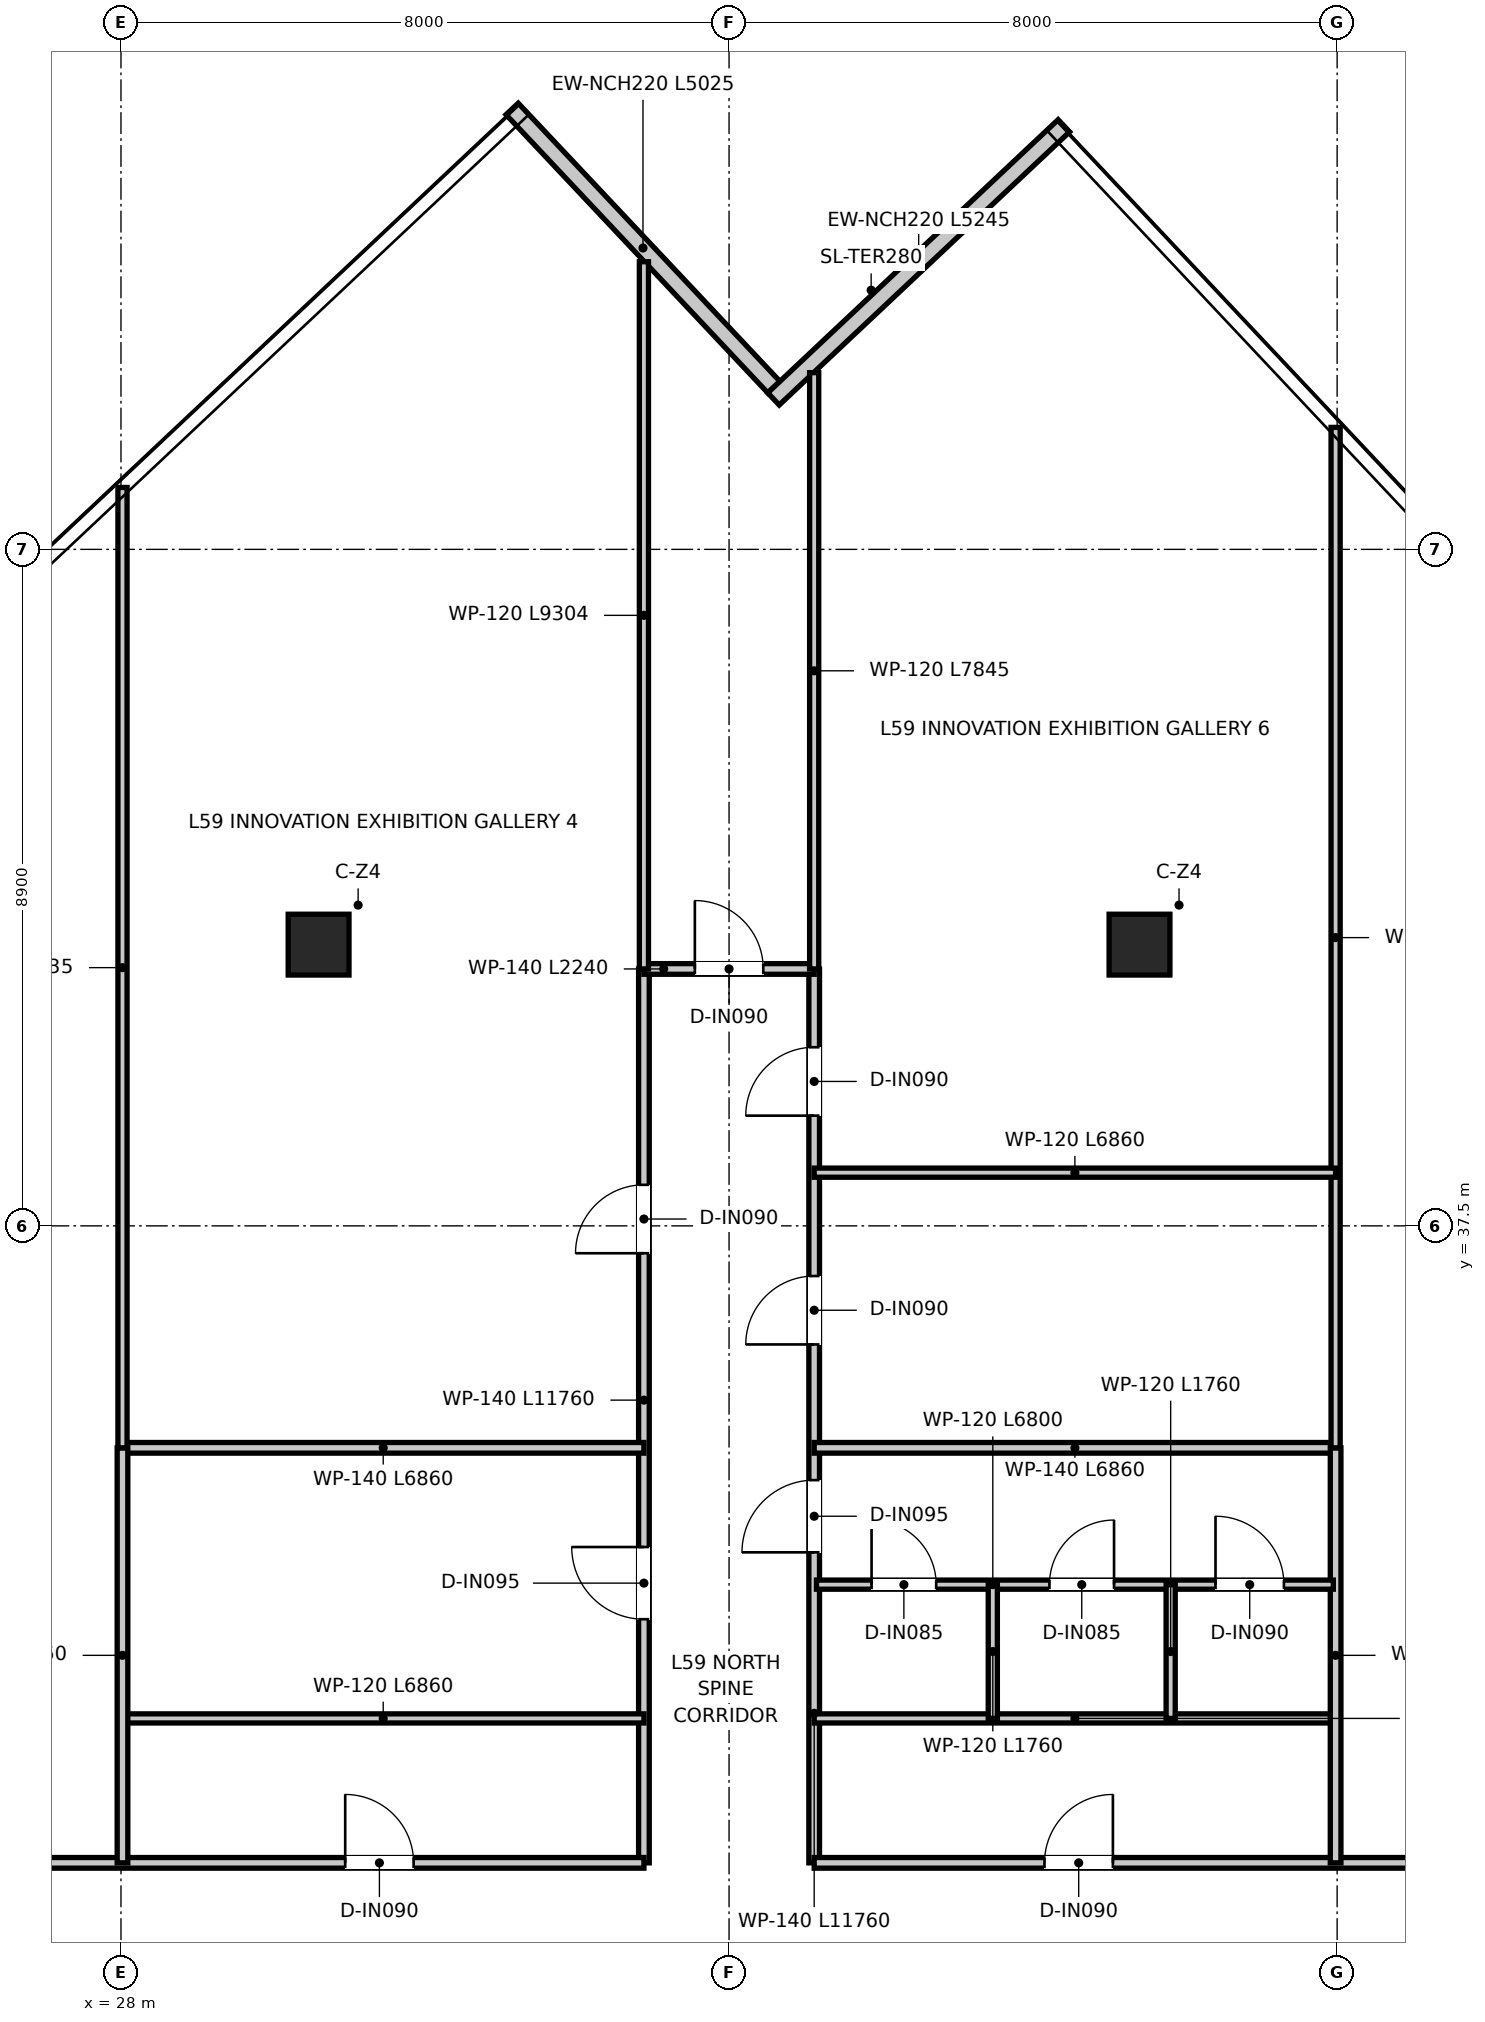
"""IFC4 building model, lengths in metres.
Left out: names, types, materials, properties, quantities, classifications, styles, units other than length and angle.
Written with IfcOpenShell. Run it as: python <this file> out.ifc"""

import sys

from ifc_helpers import new_model, si_unit, direction, frame, frame_2d, origin, origin_2d, place, context, subcontext, project, spatial, rectangle, extrude, source, transform, mapped, element, fill, save


model = new_model("IFC4")
c1 = context("Model", 3, precision=1e-05, world=origin(), true_north=direction((0.0, 1.0)))
c2 = subcontext(c1, "Body", "Model", "MODEL_VIEW")
j1 = project(units=[si_unit("LENGTHUNIT", "METRE"), si_unit("PLANEANGLEUNIT", "RADIAN")], contexts=[c1])
p1 = place(None, origin())
s1 = spatial("IfcSite", under=j1, at=p1, CompositionType="ELEMENT")
p2 = place(p1, origin())
s2 = spatial("IfcBuilding", under=s1, at=p2, CompositionType="ELEMENT")
p3 = place(p2, frame((0.0, 0.0, 242.85)))
s3 = spatial("IfcBuildingStorey", under=s2, at=p3, CompositionType="ELEMENT", Elevation=242.85)
m1 = source(origin(), c2, "Body", "SweptSolid", [
    extrude(rectangle(XDim=0.8, YDim=0.8, at=origin_2d()), origin(), (0.0, 0.0, 1.0), 3.95),
])
for number, where, z_axis, x_axis in (
    (1, (30.6, 41.2, 0.0), (0.0, 0.0, 1.0), (1.0, 0.0, 0.0)),
    (2, (41.4, 41.2, 0.0), (0.0, 0.0, 1.0), (1.0, 0.0, 0.0)),
):
    element("IfcColumn", number, at=place(p3, frame(where, z_axis=z_axis, x_axis=x_axis)), inside=s3, PredefinedType="COLUMN", context=c2, shape_type="MappedRepresentation", body=[
        mapped(m1, transform((0.0, 0.0, 0.0), x_axis=(1.0, 0.0, 0.0), y_axis=(0.0, 1.0, 0.0), z_axis=(0.0, 0.0, 1.0), scale=1.0)),
    ])
p4 = place(p3, frame((36.589, 48.535, 0.0), z_axis=(0.0, 0.0, 1.0), x_axis=(-0.685181305796, 0.728372554527, 0.0)))
e3 = element("IfcWall", 3, at=p4, inside=s3, PredefinedType="ELEMENTEDWALL", context=c2, shape_type="SweptSolid", body=[
    extrude(rectangle(XDim=5.025, YDim=0.22, at=frame_2d((2.513, 0.0))), origin(), (0.0, 0.0, 1.0), 3.67),
])
p5 = place(p3, frame((40.405, 51.973, 0.0), z_axis=(0.0, 0.0, 1.0), x_axis=(-0.728374884992, -0.685178828418, 0.0)))
e4 = element("IfcWall", 4, at=p5, inside=s3, PredefinedType="ELEMENTEDWALL", context=c2, shape_type="SweptSolid", body=[
    extrude(rectangle(XDim=5.245, YDim=0.22, at=frame_2d((2.623, 0.0))), origin(), (0.0, 0.0, 1.0), 3.67),
])
p6 = place(p3, frame((34.88, 29.12, 0.0), z_axis=(0.0, 0.0, 1.0), x_axis=(0.0, 1.0, 0.0)))
e5 = element("IfcWall", 5, at=p6, inside=s3, PredefinedType="PARTITIONING", context=c2, shape_type="SweptSolid", body=[
    extrude(rectangle(XDim=11.76, YDim=0.14, at=frame_2d((5.88, 0.0))), origin(), (0.0, 0.0, 1.0), 3.03),
])
p7 = place(p6, frame((3.205, 0.0, 0.0)))
e6 = element("IfcOpeningElement", 6, at=p7, cuts=e5, PredefinedType="OPENING", context=c2, shape_type="SweptSolid", body=[
    extrude(rectangle(XDim=0.95, YDim=2.1, at=frame_2d((0.475, 1.05))), frame((0.0, 0.08, 0.0), z_axis=(0.0, -1.0, 0.0), x_axis=(1.0, 0.0, 0.0)), (0.0, 0.0, 1.0), 0.16),
])
p8 = place(p6, frame((8.02, 0.0, 0.0)))
e7 = element("IfcOpeningElement", 7, at=p8, cuts=e5, PredefinedType="OPENING", context=c2, shape_type="SweptSolid", body=[
    extrude(rectangle(XDim=0.9, YDim=2.1, at=frame_2d((0.45, 1.05))), frame((0.0, 0.08, 0.0), z_axis=(0.0, -1.0, 0.0), x_axis=(1.0, 0.0, 0.0)), (0.0, 0.0, 1.0), 0.16),
])
p9 = place(p3, frame((37.12, 29.12, 0.0), z_axis=(0.0, 0.0, 1.0), x_axis=(0.0, 1.0, 0.0)))
e8 = element("IfcWall", 8, at=p9, inside=s3, PredefinedType="PARTITIONING", context=c2, shape_type="SweptSolid", body=[
    extrude(rectangle(XDim=11.76, YDim=0.14, at=frame_2d((5.88, 0.0))), origin(), (0.0, 0.0, 1.0), 3.03),
])
p10 = place(p9, frame((4.085, 0.0, 0.0)))
e9 = element("IfcOpeningElement", 9, at=p10, cuts=e8, PredefinedType="OPENING", context=c2, shape_type="SweptSolid", body=[
    extrude(rectangle(XDim=0.95, YDim=2.1, at=frame_2d((0.475, 1.05))), frame((0.0, 0.08, 0.0), z_axis=(0.0, -1.0, 0.0), x_axis=(1.0, 0.0, 0.0)), (0.0, 0.0, 1.0), 0.16),
])
p11 = place(p9, frame((6.82, 0.0, 0.0)))
e10 = element("IfcOpeningElement", 10, at=p11, cuts=e8, PredefinedType="OPENING", context=c2, shape_type="SweptSolid", body=[
    extrude(rectangle(XDim=0.9, YDim=2.1, at=frame_2d((0.45, 1.05))), frame((0.0, 0.08, 0.0), z_axis=(0.0, -1.0, 0.0), x_axis=(1.0, 0.0, 0.0)), (0.0, 0.0, 1.0), 0.16),
])
p12 = place(p9, frame((9.83, 0.0, 0.0)))
e11 = element("IfcOpeningElement", 11, at=p12, cuts=e8, PredefinedType="OPENING", context=c2, shape_type="SweptSolid", body=[
    extrude(rectangle(XDim=0.9, YDim=2.1, at=frame_2d((0.45, 1.05))), frame((0.0, 0.08, 0.0), z_axis=(0.0, -1.0, 0.0), x_axis=(1.0, 0.0, 0.0)), (0.0, 0.0, 1.0), 0.16),
])
p13 = place(p3, frame((34.88, 40.88, 0.0), z_axis=(0.0, 0.0, 1.0), x_axis=(1.0, 0.0, 0.0)))
e12 = element("IfcWall", 12, at=p13, inside=s3, PredefinedType="PARTITIONING", context=c2, shape_type="SweptSolid", body=[
    extrude(rectangle(XDim=2.24, YDim=0.14, at=frame_2d((1.12, 0.0))), origin(), (0.0, 0.0, 1.0), 3.67),
])
p14 = place(p13, frame((0.67, 0.0, 0.0)))
e13 = element("IfcOpeningElement", 13, at=p14, cuts=e12, PredefinedType="OPENING", context=c2, shape_type="SweptSolid", body=[
    extrude(rectangle(XDim=0.9, YDim=2.1, at=frame_2d((0.45, 1.05))), frame((0.0, 0.08, 0.0), z_axis=(0.0, -1.0, 0.0), x_axis=(1.0, 0.0, 0.0)), (0.0, 0.0, 1.0), 0.16),
])
p15 = place(p3, frame((12.752, 29.12, 0.0), z_axis=(0.0, 0.0, 1.0), x_axis=(1.0, 0.0, 0.0)))
e14 = element("IfcWall", 14, at=p15, inside=s3, PredefinedType="PARTITIONING", context=c2, shape_type="SweptSolid", body=[
    extrude(rectangle(XDim=22.128, YDim=0.14, at=frame_2d((11.064, 0.0))), origin(), (0.0, 0.0, 1.0), 3.03),
])
p16 = place(p15, frame((18.198, 0.0, 0.0)))
e15 = element("IfcOpeningElement", 15, at=p16, cuts=e14, PredefinedType="OPENING", context=c2, shape_type="SweptSolid", body=[
    extrude(rectangle(XDim=0.9, YDim=2.1, at=frame_2d((0.45, 1.05))), frame((0.0, 0.08, 0.0), z_axis=(0.0, -1.0, 0.0), x_axis=(1.0, 0.0, 0.0)), (0.0, 0.0, 1.0), 0.16),
])
p17 = place(p15, frame((4.178, 0.0, 0.0)))
e16 = element("IfcOpeningElement", 16, at=p17, cuts=e14, PredefinedType="OPENING", context=c2, shape_type="SweptSolid", body=[
    extrude(rectangle(XDim=0.9, YDim=2.1, at=frame_2d((0.45, 1.05))), frame((0.0, 0.08, 0.0), z_axis=(0.0, -1.0, 0.0), x_axis=(1.0, 0.0, 0.0)), (0.0, 0.0, 1.0), 0.16),
])
p18 = place(p15, frame((12.198, 0.0, 0.0)))
e17 = element("IfcOpeningElement", 17, at=p18, cuts=e14, PredefinedType="OPENING", context=c2, shape_type="SweptSolid", body=[
    extrude(rectangle(XDim=0.9, YDim=2.1, at=frame_2d((0.45, 1.05))), frame((0.0, 0.08, 0.0), z_axis=(0.0, -1.0, 0.0), x_axis=(1.0, 0.0, 0.0)), (0.0, 0.0, 1.0), 0.16),
])
p19 = place(p3, frame((37.12, 29.12, 0.0), z_axis=(0.0, 0.0, 1.0), x_axis=(1.0, 0.0, 0.0)))
e18 = element("IfcWall", 18, at=p19, inside=s3, PredefinedType="PARTITIONING", context=c2, shape_type="SweptSolid", body=[
    extrude(rectangle(XDim=23.746, YDim=0.14, at=frame_2d((11.873, 0.0))), origin(), (0.0, 0.0, 1.0), 3.03),
])
p20 = place(p19, frame((3.03, 0.0, 0.0)))
e19 = element("IfcOpeningElement", 19, at=p20, cuts=e18, PredefinedType="OPENING", context=c2, shape_type="SweptSolid", body=[
    extrude(rectangle(XDim=0.9, YDim=2.1, at=frame_2d((0.45, 1.05))), frame((0.0, 0.08, 0.0), z_axis=(0.0, -1.0, 0.0), x_axis=(1.0, 0.0, 0.0)), (0.0, 0.0, 1.0), 0.16),
])
p21 = place(p19, frame((14.64, 0.0, 0.0)))
e20 = element("IfcOpeningElement", 20, at=p21, cuts=e18, PredefinedType="OPENING", context=c2, shape_type="SweptSolid", body=[
    extrude(rectangle(XDim=0.9, YDim=2.1, at=frame_2d((0.45, 1.05))), frame((0.0, 0.08, 0.0), z_axis=(0.0, -1.0, 0.0), x_axis=(1.0, 0.0, 0.0)), (0.0, 0.0, 1.0), 0.16),
])
for number, where, z_axis, x_axis in (
    (21, (28.02, 31.02, 0.0), (0.0, 0.0, 1.0), (1.0, 0.0, 0.0)),
    (22, (37.12, 31.02, 0.0), (0.0, 0.0, 1.0), (1.0, 0.0, 0.0)),
):
    element("IfcWall", number, at=place(p3, frame(where, z_axis=z_axis, x_axis=x_axis)), inside=s3, PredefinedType="PARTITIONING", context=c2, shape_type="SweptSolid", body=[
        extrude(rectangle(XDim=6.86, YDim=0.12, at=frame_2d((3.43, 0.0))), origin(), (0.0, 0.0, 1.0), 3.18),
    ])
for number, where, z_axis, x_axis in (
    (23, (28.02, 34.58, 0.0), (0.0, 0.0, 1.0), (1.0, 0.0, 0.0)),
    (24, (37.12, 34.58, 0.0), (0.0, 0.0, 1.0), (1.0, 0.0, 0.0)),
):
    element("IfcWall", number, at=place(p3, frame(where, z_axis=z_axis, x_axis=x_axis)), inside=s3, PredefinedType="PARTITIONING", context=c2, shape_type="SweptSolid", body=[
        extrude(rectangle(XDim=6.86, YDim=0.14, at=frame_2d((3.43, 0.0))), origin(), (0.0, 0.0, 1.0), 3.18),
    ])
for number, where, z_axis, x_axis in (
    (25, (28.02, 29.12, 0.0), (0.0, 0.0, 1.0), (0.0, 1.0, 0.0)),
    (26, (43.98, 29.12, 0.0), (0.0, 0.0, 1.0), (0.0, 1.0, 0.0)),
):
    element("IfcWall", number, at=place(p3, frame(where, z_axis=z_axis, x_axis=x_axis)), inside=s3, PredefinedType="PARTITIONING", context=c2, shape_type="SweptSolid", body=[
        extrude(rectangle(XDim=5.46, YDim=0.14, at=frame_2d((2.73, 0.0))), origin(), (0.0, 0.0, 1.0), 3.37),
    ])
p22 = place(p3, frame((37.15, 32.78, 0.0), z_axis=(0.0, 0.0, 1.0), x_axis=(1.0, 0.0, 0.0)))
e27 = element("IfcWall", 27, at=p22, inside=s3, PredefinedType="PARTITIONING", context=c2, shape_type="SweptSolid", body=[
    extrude(rectangle(XDim=6.8, YDim=0.12, at=frame_2d((3.4, 0.0))), origin(), (0.0, 0.0, 1.0), 3.18),
])
p23 = place(p22, frame((0.725, 0.0, 0.0)))
e28 = element("IfcOpeningElement", 28, at=p23, cuts=e27, PredefinedType="OPENING", context=c2, shape_type="SweptSolid", body=[
    extrude(rectangle(XDim=0.85, YDim=2.1, at=frame_2d((0.425, 1.05))), frame((0.0, 0.07, 0.0), z_axis=(0.0, -1.0, 0.0), x_axis=(1.0, 0.0, 0.0)), (0.0, 0.0, 1.0), 0.14),
])
p24 = place(p22, frame((3.065, 0.0, 0.0)))
e29 = element("IfcOpeningElement", 29, at=p24, cuts=e27, PredefinedType="OPENING", context=c2, shape_type="SweptSolid", body=[
    extrude(rectangle(XDim=0.85, YDim=2.1, at=frame_2d((0.425, 1.05))), frame((0.0, 0.07, 0.0), z_axis=(0.0, -1.0, 0.0), x_axis=(1.0, 0.0, 0.0)), (0.0, 0.0, 1.0), 0.14),
])
p25 = place(p22, frame((5.25, 0.0, 0.0)))
e30 = element("IfcOpeningElement", 30, at=p25, cuts=e27, PredefinedType="OPENING", context=c2, shape_type="SweptSolid", body=[
    extrude(rectangle(XDim=0.9, YDim=2.1, at=frame_2d((0.45, 1.05))), frame((0.0, 0.07, 0.0), z_axis=(0.0, -1.0, 0.0), x_axis=(1.0, 0.0, 0.0)), (0.0, 0.0, 1.0), 0.14),
])
for number, where, z_axis, x_axis in (
    (31, (39.47, 31.02, 0.0), (0.0, 0.0, 1.0), (0.0, 1.0, 0.0)),
    (32, (41.81, 31.02, 0.0), (0.0, 0.0, 1.0), (0.0, 1.0, 0.0)),
):
    element("IfcWall", number, at=place(p3, frame(where, z_axis=z_axis, x_axis=x_axis)), inside=s3, PredefinedType="PARTITIONING", context=c2, shape_type="SweptSolid", body=[
        extrude(rectangle(XDim=1.76, YDim=0.12, at=frame_2d((0.88, 0.0))), origin(), (0.0, 0.0, 1.0), 3.67),
    ])
p26 = place(p3, frame((34.88, 40.88, 0.0), z_axis=(0.0, 0.0, 1.0), x_axis=(0.0, 1.0, 0.0)))
e33 = element("IfcWall", 33, at=p26, inside=s3, PredefinedType="PARTITIONING", context=c2, shape_type="SweptSolid", body=[
    extrude(rectangle(XDim=9.304, YDim=0.12, at=frame_2d((4.652, 0.0))), origin(), (0.0, 0.0, 1.0), 3.28),
])
p27 = place(p3, frame((37.12, 40.88, 0.0), z_axis=(0.0, 0.0, 1.0), x_axis=(0.0, 1.0, 0.0)))
e34 = element("IfcWall", 34, at=p27, inside=s3, PredefinedType="PARTITIONING", context=c2, shape_type="SweptSolid", body=[
    extrude(rectangle(XDim=7.845, YDim=0.12, at=frame_2d((3.923, 0.0))), origin(), (0.0, 0.0, 1.0), 3.28),
])
p28 = place(p3, frame((28.02, 34.58, 0.0), z_axis=(0.0, 0.0, 1.0), x_axis=(0.0, 1.0, 0.0)))
e35 = element("IfcWall", 35, at=p28, inside=s3, PredefinedType="PARTITIONING", context=c2, shape_type="SweptSolid", body=[
    extrude(rectangle(XDim=12.635, YDim=0.12, at=frame_2d((6.317, 0.0))), origin(), (0.0, 0.0, 1.0), 3.03),
])
p29 = place(p3, frame((43.98, 34.58, 0.0), z_axis=(0.0, 0.0, 1.0), x_axis=(0.0, 1.0, 0.0)))
e36 = element("IfcWall", 36, at=p29, inside=s3, PredefinedType="PARTITIONING", context=c2, shape_type="SweptSolid", body=[
    extrude(rectangle(XDim=13.425, YDim=0.12, at=frame_2d((6.712, 0.0))), origin(), (0.0, 0.0, 1.0), 3.03),
])
p30 = place(p3, frame((37.12, 38.2, 0.0), z_axis=(0.0, 0.0, 1.0), x_axis=(1.0, 0.0, 0.0)))
e37 = element("IfcWall", 37, at=p30, inside=s3, PredefinedType="PARTITIONING", context=c2, shape_type="SweptSolid", body=[
    extrude(rectangle(XDim=6.86, YDim=0.12, at=frame_2d((3.43, 0.0))), origin(), (0.0, 0.0, 1.0), 3.18),
])
p31 = place(p16, origin())
e38 = element("IfcDoor", 38, at=p31, inside=s3, OperationType="SINGLE_SWING_LEFT", PredefinedType="DOOR", context=c2, shape_type="SweptSolid", body=[
    extrude(rectangle(XDim=0.9, YDim=2.1, at=frame_2d((0.45, 1.05))), frame((0.0, 0.025, 0.0), z_axis=(0.0, -1.0, 0.0), x_axis=(1.0, 0.0, 0.0)), (0.0, 0.0, 1.0), 0.05),
])
fill(e15, e38)
p32 = place(p20, origin())
e39 = element("IfcDoor", 39, at=p32, inside=s3, OperationType="SINGLE_SWING_RIGHT", PredefinedType="DOOR", context=c2, shape_type="SweptSolid", body=[
    extrude(rectangle(XDim=0.9, YDim=2.1, at=frame_2d((0.45, 1.05))), frame((0.0, 0.025, 0.0), z_axis=(0.0, -1.0, 0.0), x_axis=(1.0, 0.0, 0.0)), (0.0, 0.0, 1.0), 0.05),
])
fill(e19, e39)
p33 = place(p10, origin())
e40 = element("IfcDoor", 40, at=p33, inside=s3, OperationType="SINGLE_SWING_LEFT", PredefinedType="DOOR", context=c2, shape_type="SweptSolid", body=[
    extrude(rectangle(XDim=0.95, YDim=2.1, at=frame_2d((0.475, 1.05))), frame((0.0, 0.025, 0.0), z_axis=(0.0, -1.0, 0.0), x_axis=(1.0, 0.0, 0.0)), (0.0, 0.0, 1.0), 0.05),
])
fill(e9, e40)
p34 = place(p7, origin())
e41 = element("IfcDoor", 41, at=p34, inside=s3, OperationType="SINGLE_SWING_RIGHT", PredefinedType="DOOR", context=c2, shape_type="SweptSolid", body=[
    extrude(rectangle(XDim=0.95, YDim=2.1, at=frame_2d((0.475, 1.05))), frame((0.0, 0.025, 0.0), z_axis=(0.0, -1.0, 0.0), x_axis=(1.0, 0.0, 0.0)), (0.0, 0.0, 1.0), 0.05),
])
fill(e6, e41)
p35 = place(p23, origin())
e42 = element("IfcDoor", 42, at=p35, inside=s3, OperationType="SINGLE_SWING_LEFT", PredefinedType="DOOR", context=c2, shape_type="SweptSolid", body=[
    extrude(rectangle(XDim=0.85, YDim=2.1, at=frame_2d((0.425, 1.05))), frame((0.0, 0.025, 0.0), z_axis=(0.0, -1.0, 0.0), x_axis=(1.0, 0.0, 0.0)), (0.0, 0.0, 1.0), 0.05),
])
fill(e28, e42)
p36 = place(p24, origin())
e43 = element("IfcDoor", 43, at=p36, inside=s3, OperationType="SINGLE_SWING_RIGHT", PredefinedType="DOOR", context=c2, shape_type="SweptSolid", body=[
    extrude(rectangle(XDim=0.85, YDim=2.1, at=frame_2d((0.425, 1.05))), frame((0.0, 0.025, 0.0), z_axis=(0.0, -1.0, 0.0), x_axis=(1.0, 0.0, 0.0)), (0.0, 0.0, 1.0), 0.05),
])
fill(e29, e43)
p37 = place(p25, origin())
e44 = element("IfcDoor", 44, at=p37, inside=s3, OperationType="SINGLE_SWING_LEFT", PredefinedType="DOOR", context=c2, shape_type="SweptSolid", body=[
    extrude(rectangle(XDim=0.9, YDim=2.1, at=frame_2d((0.45, 1.05))), frame((0.0, 0.025, 0.0), z_axis=(0.0, -1.0, 0.0), x_axis=(1.0, 0.0, 0.0)), (0.0, 0.0, 1.0), 0.05),
])
fill(e30, e44)
p38 = place(p14, origin())
e45 = element("IfcDoor", 45, at=p38, inside=s3, OperationType="SINGLE_SWING_LEFT", PredefinedType="DOOR", context=c2, shape_type="SweptSolid", body=[
    extrude(rectangle(XDim=0.9, YDim=2.1, at=frame_2d((0.45, 1.05))), frame((0.0, 0.025, 0.0), z_axis=(0.0, -1.0, 0.0), x_axis=(1.0, 0.0, 0.0)), (0.0, 0.0, 1.0), 0.05),
])
fill(e13, e45)
p39 = place(p8, origin())
e46 = element("IfcDoor", 46, at=p39, inside=s3, OperationType="SINGLE_SWING_LEFT", PredefinedType="DOOR", context=c2, shape_type="SweptSolid", body=[
    extrude(rectangle(XDim=0.9, YDim=2.1, at=frame_2d((0.45, 1.05))), frame((0.0, 0.025, 0.0), z_axis=(0.0, -1.0, 0.0), x_axis=(1.0, 0.0, 0.0)), (0.0, 0.0, 1.0), 0.05),
])
fill(e7, e46)
p40 = place(p11, origin())
e47 = element("IfcDoor", 47, at=p40, inside=s3, OperationType="SINGLE_SWING_LEFT", PredefinedType="DOOR", context=c2, shape_type="SweptSolid", body=[
    extrude(rectangle(XDim=0.9, YDim=2.1, at=frame_2d((0.45, 1.05))), frame((0.0, 0.025, 0.0), z_axis=(0.0, -1.0, 0.0), x_axis=(1.0, 0.0, 0.0)), (0.0, 0.0, 1.0), 0.05),
])
fill(e10, e47)
p41 = place(p12, origin())
e48 = element("IfcDoor", 48, at=p41, inside=s3, OperationType="SINGLE_SWING_LEFT", PredefinedType="DOOR", context=c2, shape_type="SweptSolid", body=[
    extrude(rectangle(XDim=0.9, YDim=2.1, at=frame_2d((0.45, 1.05))), frame((0.0, 0.025, 0.0), z_axis=(0.0, -1.0, 0.0), x_axis=(1.0, 0.0, 0.0)), (0.0, 0.0, 1.0), 0.05),
])
fill(e11, e48)
save(model, sys.argv[1])
